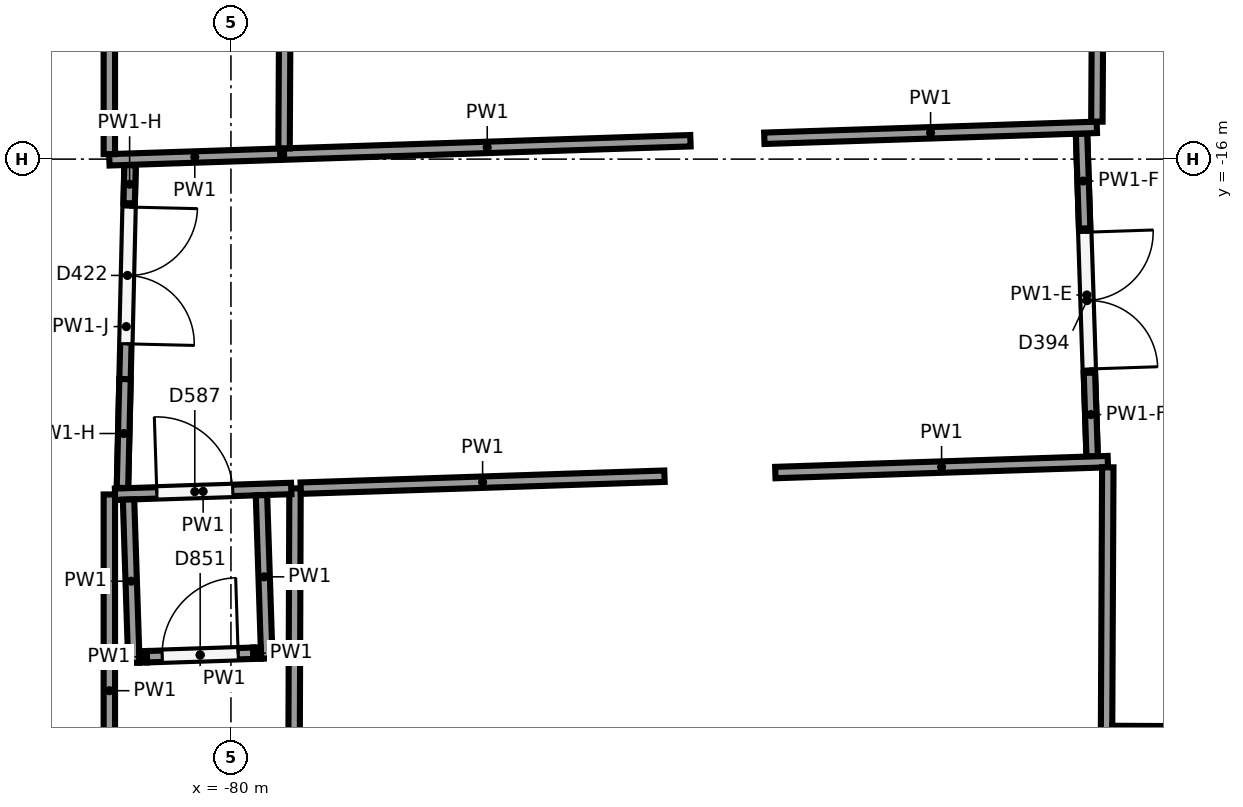
"""IFC4 building model, lengths in metres.
Left out: names, types, materials, properties, quantities, classifications, styles, units other than length and angle.
Written with IfcOpenShell. Run it as: python <this file> out.ifc"""

import sys

from ifc_helpers import new_model, si_unit, direction, frame, frame_2d, origin, origin_2d, place, context, subcontext, project, spatial, rectangle, circle, extrude, element, fill, save


model = new_model("IFC4")
c1 = context("Model", 3, precision=1e-05, world=origin(), true_north=direction((0.0, 1.0)))
c2 = subcontext(c1, "Body", "Model", "MODEL_VIEW")
j1 = project(units=[si_unit("LENGTHUNIT", "METRE"), si_unit("PLANEANGLEUNIT", "RADIAN")], contexts=[c1])
p1 = place(None, origin())
s1 = spatial("IfcSite", under=j1, at=p1, CompositionType="ELEMENT")
p2 = place(p1, origin())
s2 = spatial("IfcBuilding", under=s1, at=p2, CompositionType="ELEMENT")
p3 = place(p2, origin())
s3 = spatial("IfcBuildingStorey", under=s2, at=p3, CompositionType="ELEMENT", Elevation=0.0)
p4 = place(p3, frame((-73.482, -17.944, 0.0), z_axis=(0.0, 0.0, 1.0), x_axis=(1.0, 0.0, 0.0)))
e1 = element("IfcColumn", 1, at=p4, inside=s3, PredefinedType="COLUMN", context=c2, shape_type="SweptSolid", body=[
    extrude(circle(Radius=0.45, at=origin_2d()), origin(), (0.0, 0.0, 1.0), 6.5),
])
p5 = place(p3, frame((-68.607, -15.582, 0.0), z_axis=(0.0, 0.0, 1.0), x_axis=(-0.99945844183, -0.032906276824, 0.0)))
e2 = element("IfcWall", 2, at=p5, inside=s3, PredefinedType="PARTITIONING", context=c2, shape_type="SweptSolid", body=[
    extrude(rectangle(XDim=4.377, YDim=0.15, at=frame_2d((2.189, 0.0))), origin(), (0.0, 0.0, 1.0), 6.15),
])
p6 = place(p3, frame((-73.955, -15.758, 0.0), z_axis=(0.0, 0.0, 1.0), x_axis=(-0.999460097148, -0.032855961554, 0.0)))
e3 = element("IfcWall", 3, at=p6, inside=s3, PredefinedType="PARTITIONING", context=c2, shape_type="SweptSolid", body=[
    extrude(rectangle(XDim=5.35, YDim=0.15, at=frame_2d((2.675, 0.0))), origin(), (0.0, 0.0, 1.0), 6.15),
])
p7 = place(p3, frame((-79.301, -15.859, 0.0), z_axis=(0.0, 0.0, 1.0), x_axis=(0.00544865386, 0.999985155975, 0.0)))
e4 = element("IfcWall", 4, at=p7, inside=s3, PredefinedType="PARTITIONING", context=c2, shape_type="SweptSolid", body=[
    extrude(rectangle(XDim=9.32, YDim=0.15, at=frame_2d((4.66, 0.0))), origin(), (0.0, 0.0, 1.0), 6.15),
])
p8 = place(p3, frame((-68.551, -6.41, 0.0), z_axis=(0.0, 0.0, 1.0), x_axis=(-0.006118883866, -0.999981279455, 0.0)))
e5 = element("IfcWall", 5, at=p8, inside=s3, PredefinedType="PARTITIONING", context=c2, shape_type="SweptSolid", body=[
    extrude(rectangle(XDim=9.097, YDim=0.15, at=frame_2d((4.549, 0.0))), origin(), (0.0, 0.0, 1.0), 6.15),
])
p9 = place(p3, frame((-79.352, -15.935, 0.0), z_axis=(0.0, 0.0, 1.0), x_axis=(-0.999459266056, -0.032881233183, 0.0)))
e6 = element("IfcWall", 6, at=p9, inside=s3, PredefinedType="PARTITIONING", context=c2, shape_type="SweptSolid", body=[
    extrude(rectangle(XDim=2.25, YDim=0.15, at=frame_2d((1.125, 0.0))), origin(), (0.0, 0.0, 1.0), 6.15),
])
p10 = place(p3, frame((-81.6, -15.934, 0.0), z_axis=(0.0, 0.0, 1.0), x_axis=(0.0, 1.0, 0.0)))
e7 = element("IfcWall", 7, at=p10, inside=s3, PredefinedType="PARTITIONING", context=c2, shape_type="SweptSolid", body=[
    extrude(rectangle(XDim=4.084, YDim=0.15, at=frame_2d((2.042, 0.0))), origin(), (0.0, 0.0, 1.0), 6.15),
])
p11 = place(p3, frame((-79.191, -29.725, 0.0), z_axis=(0.0, 0.0, 1.0), x_axis=(0.003612711966, 0.999993474135, 0.0)))
e8 = element("IfcWall", 8, at=p11, inside=s3, PredefinedType="PARTITIONING", context=c2, shape_type="SweptSolid", body=[
    extrude(rectangle(XDim=9.393, YDim=0.15, at=frame_2d((4.697, 0.0))), origin(), (0.0, 0.0, 1.0), 6.15),
])
p12 = place(p3, frame((-79.082, -20.329, 0.0), z_axis=(0.0, 0.0, 1.0), x_axis=(0.999459186373, 0.032883655132, 0.0)))
e9 = element("IfcWall", 9, at=p12, inside=s3, PredefinedType="PARTITIONING", context=c2, shape_type="SweptSolid", body=[
    extrude(rectangle(XDim=4.789, YDim=0.15, at=frame_2d((2.395, 0.0))), origin(), (0.0, 0.0, 1.0), 6.15),
])
p13 = place(p3, frame((-72.838, -20.124, 0.0), z_axis=(0.0, 0.0, 1.0), x_axis=(0.999458381432, 0.032908111225, 0.0)))
e10 = element("IfcWall", 10, at=p13, inside=s3, PredefinedType="PARTITIONING", context=c2, shape_type="SweptSolid", body=[
    extrude(rectangle(XDim=4.377, YDim=0.15, at=frame_2d((2.188, 0.0))), origin(), (0.0, 0.0, 1.0), 6.15),
])
p14 = place(p3, frame((-68.463, -20.055, 0.0), z_axis=(0.0, 0.0, 1.0), x_axis=(-0.004750858989, -0.999988714606, 0.0)))
e11 = element("IfcWall", 11, at=p14, inside=s3, PredefinedType="PARTITIONING", context=c2, shape_type="SweptSolid", body=[
    extrude(rectangle(XDim=9.096, YDim=0.15, at=frame_2d((4.548, 0.0))), origin(), (0.0, 0.0, 1.0), 6.15),
])
p15 = place(p14, frame((3.95, 0.0, 0.0)))
e12 = element("IfcOpeningElement", 12, at=p15, cuts=e11, PredefinedType="OPENING", context=c2, shape_type="SweptSolid", body=[
    extrude(rectangle(XDim=1.0, YDim=2.1, at=frame_2d((0.5, 1.05))), frame((0.0, 0.085, 0.0), z_axis=(0.0, -1.0, 0.0), x_axis=(1.0, 0.0, 0.0)), (0.0, 0.0, 1.0), 0.17),
])
p16 = place(p3, frame((-81.6, -25.575, 0.0), z_axis=(0.0, 0.0, 1.0), x_axis=(0.0, 1.0, 0.0)))
e13 = element("IfcWall", 13, at=p16, inside=s3, PredefinedType="PARTITIONING", context=c2, shape_type="SweptSolid", body=[
    extrude(rectangle(XDim=5.163, YDim=0.15, at=frame_2d((2.582, 0.0))), origin(), (0.0, 0.0, 1.0), 6.15),
])
p17 = place(p3, frame((-81.525, -20.409, 0.0), z_axis=(0.0, 0.0, 1.0), x_axis=(0.999460453172, 0.032845129702, 0.0)))
e14 = element("IfcWall", 14, at=p17, inside=s3, PredefinedType="PARTITIONING", context=c2, shape_type="SweptSolid", body=[
    extrude(rectangle(XDim=2.319, YDim=0.15, at=frame_2d((1.16, 0.0))), origin(), (0.0, 0.0, 1.0), 6.15),
])
p18 = place(p17, frame((0.55, 0.0, 0.0)))
e15 = element("IfcOpeningElement", 15, at=p18, cuts=e14, PredefinedType="OPENING", context=c2, shape_type="SweptSolid", body=[
    extrude(rectangle(XDim=1.0, YDim=2.1, at=frame_2d((0.5, 1.05))), frame((0.0, 0.085, 0.0), z_axis=(0.0, -1.0, 0.0), x_axis=(1.0, 0.0, 0.0)), (0.0, 0.0, 1.0), 0.17),
])
p19 = place(p3, frame((-68.405, -23.53, 0.0), z_axis=(0.0, 0.0, 1.0), x_axis=(0.999988600724, -0.004774769228, 0.0)))
e16 = element("IfcWall", 16, at=p19, inside=s3, PredefinedType="PARTITIONING", context=c2, shape_type="SweptSolid", body=[
    extrude(rectangle(XDim=2.25, YDim=0.15, at=frame_2d((1.125, 0.0))), origin(), (0.0, 0.0, 1.0), 6.15),
])
p20 = place(p3, frame((-81.348, -20.479, 0.0), z_axis=(0.0, 0.0, 1.0), x_axis=(0.032819488058, -0.999461295501, 0.0)))
e17 = element("IfcWall", 17, at=p20, inside=s3, PredefinedType="PARTITIONING", context=c2, shape_type="SweptSolid", body=[
    extrude(rectangle(XDim=2.15, YDim=0.15, at=frame_2d((1.075, 0.0))), origin(), (0.0, 0.0, 1.0), 6.15),
])
p21 = place(p3, frame((-79.599, -20.421, 0.0), z_axis=(0.0, 0.0, 1.0), x_axis=(0.032929189875, -0.999457687175, 0.0)))
e18 = element("IfcWall", 18, at=p21, inside=s3, PredefinedType="PARTITIONING", context=c2, shape_type="SweptSolid", body=[
    extrude(rectangle(XDim=2.15, YDim=0.15, at=frame_2d((1.075, 0.0))), origin(), (0.0, 0.0, 1.0), 6.15),
])
p22 = place(p3, frame((-81.205, -22.55, 0.0), z_axis=(0.0, 0.0, 1.0), x_axis=(0.999417522997, 0.034126452005, 0.0)))
e19 = element("IfcWall", 19, at=p22, inside=s3, PredefinedType="PARTITIONING", context=c2, shape_type="SweptSolid", body=[
    extrude(rectangle(XDim=0.1, YDim=0.15, at=frame_2d((0.05, 0.0))), origin(), (0.0, 0.0, 1.0), 6.15),
])
p23 = place(p3, frame((-81.104, -22.546, 0.0), z_axis=(0.0, 0.0, 1.0), x_axis=(0.999462381074, 0.032786412082, 0.0)))
e20 = element("IfcWall", 20, at=p23, inside=s3, PredefinedType="PARTITIONING", context=c2, shape_type="SweptSolid", body=[
    extrude(rectangle(XDim=1.4, YDim=0.15, at=frame_2d((0.7, 0.0))), origin(), (0.0, 0.0, 1.0), 6.15),
])
p24 = place(p23, frame((0.2, 0.0, 0.0)))
e21 = element("IfcOpeningElement", 21, at=p24, cuts=e20, PredefinedType="OPENING", context=c2, shape_type="SweptSolid", body=[
    extrude(rectangle(XDim=1.0, YDim=2.1, at=frame_2d((0.5, 1.05))), frame((0.0, 0.085, 0.0), z_axis=(0.0, -1.0, 0.0), x_axis=(1.0, 0.0, 0.0)), (0.0, 0.0, 1.0), 0.17),
])
p25 = place(p3, frame((-79.705, -22.5, 0.0), z_axis=(0.0, 0.0, 1.0), x_axis=(0.999495244364, 0.031768797498, 0.0)))
e22 = element("IfcWall", 22, at=p25, inside=s3, PredefinedType="PARTITIONING", context=c2, shape_type="SweptSolid", body=[
    extrude(rectangle(XDim=0.1, YDim=0.15, at=frame_2d((0.05, 0.0))), origin(), (0.0, 0.0, 1.0), 6.15),
])
p26 = place(p3, frame((-81.327, -16.081, 0.0), z_axis=(0.0, 0.0, 1.0), x_axis=(-0.023572927834, -0.999722119928, 0.0)))
e23 = element("IfcWall", 23, at=p26, inside=s3, PredefinedType="PARTITIONING", context=c2, shape_type="SweptSolid", body=[
    extrude(rectangle(XDim=4.246, YDim=0.15, at=frame_2d((2.123, 0.0))), origin(), (0.0, 0.0, 1.0), 5.05),
])
p27 = place(p26, frame((0.55, 0.0, 0.0)))
e24 = element("IfcOpeningElement", 24, at=p27, cuts=e23, PredefinedType="OPENING", context=c2, shape_type="SweptSolid", body=[
    extrude(rectangle(XDim=1.8, YDim=2.1, at=frame_2d((0.9, 1.05))), frame((0.0, 0.085, 0.0), z_axis=(0.0, -1.0, 0.0), x_axis=(1.0, 0.0, 0.0)), (0.0, 0.0, 1.0), 0.17),
])
p28 = place(p3, frame((-81.327, -16.081, 5.05), z_axis=(0.0, 0.0, 1.0), x_axis=(-0.023431065349, -0.999725454901, 0.0)))
e25 = element("IfcWall", 25, at=p28, inside=s3, PredefinedType="PARTITIONING", context=c2, shape_type="SweptSolid", body=[
    extrude(rectangle(XDim=0.5, YDim=0.15, at=frame_2d((0.25, 0.0))), origin(), (0.0, 0.0, 1.0), 1.1),
])
p29 = place(p3, frame((-81.394, -18.894, 5.05), z_axis=(0.0, 0.0, 1.0), x_axis=(-0.023526910325, -0.999723203937, 0.0)))
e26 = element("IfcWall", 26, at=p29, inside=s3, PredefinedType="PARTITIONING", context=c2, shape_type="SweptSolid", body=[
    extrude(rectangle(XDim=1.432, YDim=0.15, at=frame_2d((0.716, 0.0))), origin(), (0.0, 0.0, 1.0), 1.1),
])
p30 = place(p3, frame((-68.809, -15.665, 0.0), z_axis=(0.0, 0.0, 1.0), x_axis=(0.032872799659, -0.999459543475, 0.0)))
e27 = element("IfcWall", 27, at=p30, inside=s3, PredefinedType="PARTITIONING", context=c2, shape_type="SweptSolid", body=[
    extrude(rectangle(XDim=4.248, YDim=0.15, at=frame_2d((2.124, 0.0))), origin(), (0.0, 0.0, 1.0), 5.25),
])
p31 = place(p30, frame((1.298, 0.0, 0.0)))
e28 = element("IfcOpeningElement", 28, at=p31, cuts=e27, PredefinedType="OPENING", context=c2, shape_type="SweptSolid", body=[
    extrude(rectangle(XDim=1.8, YDim=2.1, at=frame_2d((0.9, 1.05))), frame((0.0, 0.085, 0.0), z_axis=(0.0, -1.0, 0.0), x_axis=(1.0, 0.0, 0.0)), (0.0, 0.0, 1.0), 0.17),
])
p32 = place(p3, frame((-68.705, -18.811, 5.25), z_axis=(0.0, 0.0, 1.0), x_axis=(0.032849239857, -0.999460318092, 0.0)))
e29 = element("IfcWall", 29, at=p32, inside=s3, PredefinedType="PARTITIONING", context=c2, shape_type="SweptSolid", body=[
    extrude(rectangle(XDim=1.1, YDim=0.15, at=frame_2d((0.55, 0.0))), origin(), (0.0, 0.0, 1.0), 0.9),
])
p33 = place(p3, frame((-68.809, -15.665, 5.25), z_axis=(0.0, 0.0, 1.0), x_axis=(0.033054334832, -0.999453556174, 0.0)))
e30 = element("IfcWall", 30, at=p33, inside=s3, PredefinedType="PARTITIONING", context=c2, shape_type="SweptSolid", body=[
    extrude(rectangle(XDim=1.248, YDim=0.15, at=frame_2d((0.624, 0.0))), origin(), (0.0, 0.0, 1.0), 0.9),
])
p34 = place(p18, origin())
e31 = element("IfcDoor", 31, at=p34, inside=s3, OperationType="SINGLE_SWING_LEFT", PredefinedType="DOOR", context=c2, shape_type="SweptSolid", body=[
    extrude(rectangle(XDim=1.0, YDim=2.1, at=frame_2d((0.5, 1.05))), frame((0.0, 0.025, 0.0), z_axis=(0.0, -1.0, 0.0), x_axis=(1.0, 0.0, 0.0)), (0.0, 0.0, 1.0), 0.05),
])
fill(e15, e31)
p35 = place(p24, origin())
e32 = element("IfcDoor", 32, at=p35, inside=s3, OperationType="SINGLE_SWING_RIGHT", PredefinedType="DOOR", context=c2, shape_type="SweptSolid", body=[
    extrude(rectangle(XDim=1.0, YDim=2.1, at=frame_2d((0.5, 1.05))), frame((0.0, 0.025, 0.0), z_axis=(0.0, -1.0, 0.0), x_axis=(1.0, 0.0, 0.0)), (0.0, 0.0, 1.0), 0.05),
])
fill(e21, e32)
p36 = place(p27, origin())
e33 = element("IfcDoor", 33, at=p36, inside=s3, OperationType="DOUBLE_DOOR_SINGLE_SWING", PredefinedType="DOOR", context=c2, shape_type="SweptSolid", body=[
    extrude(rectangle(XDim=1.8, YDim=2.1, at=frame_2d((0.9, 1.05))), frame((0.0, 0.025, 0.0), z_axis=(0.0, -1.0, 0.0), x_axis=(1.0, 0.0, 0.0)), (0.0, 0.0, 1.0), 0.05),
])
fill(e24, e33)
p37 = place(p31, origin())
e34 = element("IfcDoor", 34, at=p37, inside=s3, OperationType="DOUBLE_DOOR_SINGLE_SWING", PredefinedType="DOOR", context=c2, shape_type="SweptSolid", body=[
    extrude(rectangle(XDim=1.8, YDim=2.1, at=frame_2d((0.9, 1.05))), frame((0.0, 0.025, 0.0), z_axis=(0.0, -1.0, 0.0), x_axis=(1.0, 0.0, 0.0)), (0.0, 0.0, 1.0), 0.05),
])
fill(e28, e34)
save(model, sys.argv[1])
